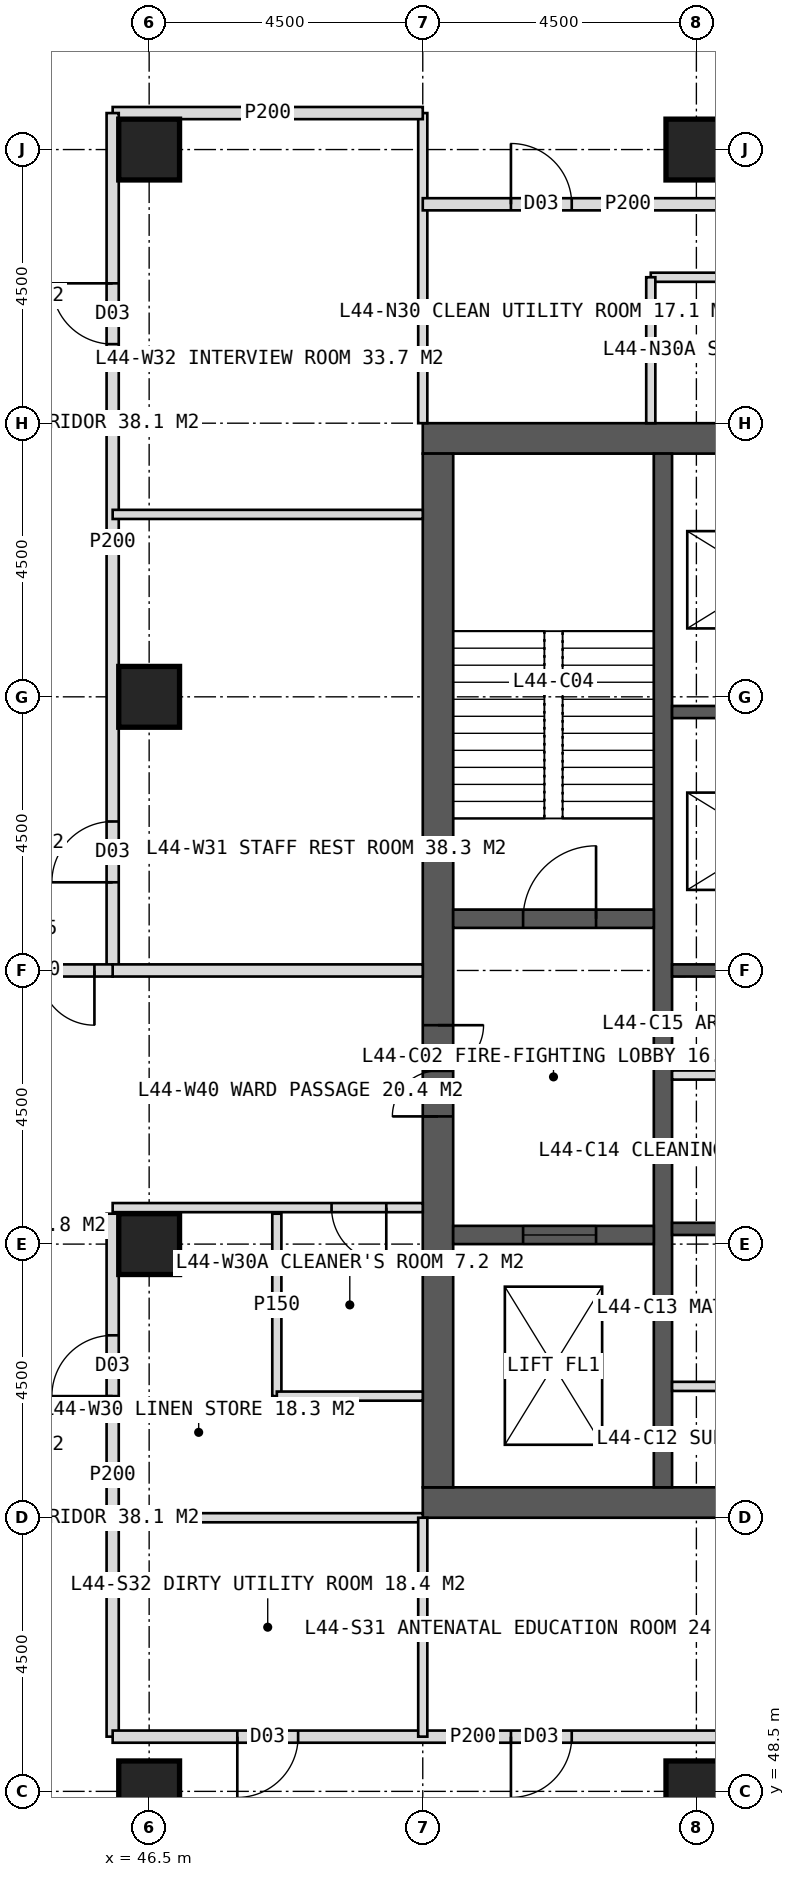
"""IFC4 building model, lengths in metres.
Left out: names, types, materials, properties, quantities, classifications, styles, units other than length and angle.
Written with IfcOpenShell. Run it as: python <this file> out.ifc"""

import sys

from ifc_helpers import new_model, si_unit, direction, frame, frame_2d, origin, origin_2d, place, context, subcontext, project, spatial, rectangle, hollow_rectangle, extrude, element, fill, save


model = new_model("IFC4")
c1 = context("Model", 3, precision=1e-05, world=origin(), true_north=direction((0.0, 1.0)))
c2 = subcontext(c1, "Body", "Model", "MODEL_VIEW")
j1 = project(units=[si_unit("LENGTHUNIT", "METRE"), si_unit("PLANEANGLEUNIT", "RADIAN")], contexts=[c1])
p1 = place(None, origin())
s1 = spatial("IfcSite", under=j1, at=p1, CompositionType="ELEMENT")
p2 = place(p1, origin())
s2 = spatial("IfcBuilding", under=s1, at=p2, CompositionType="ELEMENT")
p3 = place(p2, frame((0.0, 0.0, 185.0)))
s3 = spatial("IfcBuildingStorey", under=s2, at=p3, CompositionType="ELEMENT", Elevation=185.0)
p4 = place(p3, frame((51.0, 70.75, 0.0), z_axis=(0.0, 0.0, 1.0), x_axis=(1.0, 0.0, 0.0)))
e1 = element("IfcWall", 1, at=p4, inside=s3, PredefinedType="SHEAR", context=c2, shape_type="SweptSolid", body=[
    extrude(rectangle(XDim=18.0, YDim=0.5, at=frame_2d((9.0, 0.0))), origin(), (0.0, 0.0, 1.0), 4.0),
])
p5 = place(p4, frame((8.1, 0.0, 0.0)))
e2 = element("IfcOpeningElement", 2, at=p5, cuts=e1, PredefinedType="OPENING", context=c2, shape_type="SweptSolid", body=[
    extrude(rectangle(XDim=1.8, YDim=2.2, at=frame_2d((0.9, 1.1))), frame((0.0, 0.26, 0.0), z_axis=(0.0, -1.0, 0.0), x_axis=(1.0, 0.0, 0.0)), (0.0, 0.0, 1.0), 0.52),
])
p6 = place(p3, frame((51.0, 53.25, 0.0), z_axis=(0.0, 0.0, 1.0), x_axis=(1.0, 0.0, 0.0)))
e3 = element("IfcWall", 3, at=p6, inside=s3, PredefinedType="SHEAR", context=c2, shape_type="SweptSolid", body=[
    extrude(rectangle(XDim=18.0, YDim=0.5, at=frame_2d((9.0, 0.0))), origin(), (0.0, 0.0, 1.0), 4.0),
])
p7 = place(p6, frame((8.1, 0.0, 0.0)))
e4 = element("IfcOpeningElement", 4, at=p7, cuts=e3, PredefinedType="OPENING", context=c2, shape_type="SweptSolid", body=[
    extrude(rectangle(XDim=1.8, YDim=2.2, at=frame_2d((0.9, 1.1))), frame((0.0, 0.26, 0.0), z_axis=(0.0, -1.0, 0.0), x_axis=(1.0, 0.0, 0.0)), (0.0, 0.0, 1.0), 0.52),
])
p8 = place(p3, frame((51.25, 53.5, 0.0), z_axis=(0.0, 0.0, 1.0), x_axis=(0.0, 1.0, 0.0)))
e5 = element("IfcWall", 5, at=p8, inside=s3, PredefinedType="SHEAR", context=c2, shape_type="SweptSolid", body=[
    extrude(rectangle(XDim=17.0, YDim=0.5, at=frame_2d((8.5, 0.0))), origin(), (0.0, 0.0, 1.0), 4.0),
])
p9 = place(p8, frame((6.1, 0.0, 0.0)))
e6 = element("IfcOpeningElement", 6, at=p9, cuts=e5, PredefinedType="OPENING", context=c2, shape_type="SweptSolid", body=[
    extrude(rectangle(XDim=1.5, YDim=2.2, at=frame_2d((0.75, 1.1))), frame((0.0, 0.26, 0.0), z_axis=(0.0, -1.0, 0.0), x_axis=(1.0, 0.0, 0.0)), (0.0, 0.0, 1.0), 0.52),
])
p10 = place(p3, frame((54.95, 53.5, 0.0), z_axis=(0.0, 0.0, 1.0), x_axis=(0.0, 1.0, 0.0)))
e7 = element("IfcWall", 7, at=p10, inside=s3, PredefinedType="SHEAR", context=c2, shape_type="SweptSolid", body=[
    extrude(rectangle(XDim=17.0, YDim=0.3, at=frame_2d((8.5, 0.0))), origin(), (0.0, 0.0, 1.0), 4.0),
])
for number, where, z_axis, x_axis in (
    (8, (55.1, 57.75, 0.0), (0.0, 0.0, 1.0), (1.0, 0.0, 0.0)),
    (9, (55.1, 62.0, 0.0), (0.0, 0.0, 1.0), (1.0, 0.0, 0.0)),
    (10, (55.1, 66.25, 0.0), (0.0, 0.0, 1.0), (1.0, 0.0, 0.0)),
):
    element("IfcWall", number, at=place(p3, frame(where, z_axis=z_axis, x_axis=x_axis)), inside=s3, PredefinedType="SHEAR", context=c2, shape_type="SweptSolid", body=[
        extrude(rectangle(XDim=3.05, YDim=0.2, at=frame_2d((1.525, 0.0))), origin(), (0.0, 0.0, 1.0), 4.0),
    ])
p11 = place(p3, frame((51.5, 62.85, 0.0), z_axis=(0.0, 0.0, 1.0), x_axis=(1.0, 0.0, 0.0)))
e11 = element("IfcWall", 11, at=p11, inside=s3, PredefinedType="SHEAR", context=c2, shape_type="SweptSolid", body=[
    extrude(rectangle(XDim=3.3, YDim=0.3, at=frame_2d((1.65, 0.0))), origin(), (0.0, 0.0, 1.0), 4.0),
])
p12 = place(p11, frame((1.15, 0.0, 0.0)))
e12 = element("IfcOpeningElement", 12, at=p12, cuts=e11, PredefinedType="OPENING", context=c2, shape_type="SweptSolid", body=[
    extrude(rectangle(XDim=1.2, YDim=2.1, at=frame_2d((0.6, 1.05))), frame((0.0, 0.16, 0.0), z_axis=(0.0, -1.0, 0.0), x_axis=(1.0, 0.0, 0.0)), (0.0, 0.0, 1.0), 0.32),
])
p13 = place(p3, frame((51.5, 57.65, 0.0), z_axis=(0.0, 0.0, 1.0), x_axis=(1.0, 0.0, 0.0)))
e13 = element("IfcWall", 13, at=p13, inside=s3, PredefinedType="SHEAR", context=c2, shape_type="SweptSolid", body=[
    extrude(rectangle(XDim=3.3, YDim=0.3, at=frame_2d((1.65, 0.0))), origin(), (0.0, 0.0, 1.0), 4.0),
])
p14 = place(p13, frame((1.15, 0.0, 0.0)))
e14 = element("IfcOpeningElement", 14, at=p14, cuts=e13, PredefinedType="OPENING", context=c2, shape_type="SweptSolid", body=[
    extrude(rectangle(XDim=1.2, YDim=2.2, at=frame_2d((0.6, 1.1))), frame((0.0, 0.16, 0.0), z_axis=(0.0, -1.0, 0.0), x_axis=(1.0, 0.0, 0.0)), (0.0, 0.0, 1.0), 0.32),
])
for number, where, z_axis, x_axis in (
    (15, (46.5, 48.5, 0.0), (0.0, 0.0, 1.0), (1.0, 0.0, 0.0)),
    (16, (46.5, 75.5, 0.0), (0.0, 0.0, 1.0), (1.0, 0.0, 0.0)),
    (17, (55.5, 48.5, 0.0), (0.0, 0.0, 1.0), (1.0, 0.0, 0.0)),
    (18, (55.5, 75.5, 0.0), (0.0, 0.0, 1.0), (1.0, 0.0, 0.0)),
    (19, (46.5, 57.5, 0.0), (0.0, 0.0, 1.0), (1.0, 0.0, 0.0)),
    (20, (46.5, 66.5, 0.0), (0.0, 0.0, 1.0), (1.0, 0.0, 0.0)),
):
    element("IfcColumn", number, at=place(p3, frame(where, z_axis=z_axis, x_axis=x_axis)), inside=s3, PredefinedType="COLUMN", context=c2, shape_type="SweptSolid", body=[
        extrude(hollow_rectangle(XDim=1.0, YDim=1.0, WallThickness=0.1, at=origin_2d()), origin(), (0.0, 0.0, 1.0), 4.0),
    ])
p15 = place(p3, frame((51.0, 71.0, 0.0), z_axis=(0.0, 0.0, 1.0), x_axis=(0.0, 1.0, 0.0)))
e21 = element("IfcWall", 21, at=p15, inside=s3, PredefinedType="PARTITIONING", context=c2, shape_type="SweptSolid", body=[
    extrude(rectangle(XDim=5.1, YDim=0.15, at=frame_2d((2.55, 0.0))), origin(), (0.0, 0.0, 1.0), 3.75),
])
p16 = place(p3, frame((45.9, 76.1, 0.0), z_axis=(0.0, 0.0, 1.0), x_axis=(1.0, 0.0, 0.0)))
e22 = element("IfcWall", 22, at=p16, inside=s3, PredefinedType="PARTITIONING", context=c2, shape_type="SweptSolid", body=[
    extrude(rectangle(XDim=5.1, YDim=0.2, at=frame_2d((2.55, 0.0))), origin(), (0.0, 0.0, 1.0), 3.75),
])
p17 = place(p3, frame((51.0, 74.6, 0.0), z_axis=(0.0, 0.0, 1.0), x_axis=(1.0, 0.0, 0.0)))
e23 = element("IfcWall", 23, at=p17, inside=s3, PredefinedType="PARTITIONING", context=c2, shape_type="SweptSolid", body=[
    extrude(rectangle(XDim=6.75, YDim=0.2, at=frame_2d((3.375, 0.0))), origin(), (0.0, 0.0, 1.0), 3.75),
])
p18 = place(p17, frame((1.45, 0.0, 0.0)))
e24 = element("IfcOpeningElement", 24, at=p18, cuts=e23, PredefinedType="OPENING", context=c2, shape_type="SweptSolid", body=[
    extrude(rectangle(XDim=1.0, YDim=2.1, at=frame_2d((0.5, 1.05))), frame((0.0, 0.11, 0.0), z_axis=(0.0, -1.0, 0.0), x_axis=(1.0, 0.0, 0.0)), (0.0, 0.0, 1.0), 0.22),
])
p19 = place(p3, frame((54.75, 73.4, 0.0), z_axis=(0.0, 0.0, 1.0), x_axis=(1.0, 0.0, 0.0)))
e25 = element("IfcWall", 25, at=p19, inside=s3, PredefinedType="PARTITIONING", context=c2, shape_type="SweptSolid", body=[
    extrude(rectangle(XDim=3.0, YDim=0.15, at=frame_2d((1.5, 0.0))), origin(), (0.0, 0.0, 1.0), 3.75),
])
p20 = place(p3, frame((54.75, 71.0, 0.0), z_axis=(0.0, 0.0, 1.0), x_axis=(0.0, 1.0, 0.0)))
e26 = element("IfcWall", 26, at=p20, inside=s3, PredefinedType="PARTITIONING", context=c2, shape_type="SweptSolid", body=[
    extrude(rectangle(XDim=2.4, YDim=0.15, at=frame_2d((1.2, 0.0))), origin(), (0.0, 0.0, 1.0), 3.75),
])
p21 = place(p3, frame((51.0, 53.0, 0.0), z_axis=(0.0, 0.0, 1.0), x_axis=(-1.0, 0.0, 0.0)))
e27 = element("IfcWall", 27, at=p21, inside=s3, PredefinedType="PARTITIONING", context=c2, shape_type="SweptSolid", body=[
    extrude(rectangle(XDim=5.1, YDim=0.15, at=frame_2d((2.55, 0.0))), origin(), (0.0, 0.0, 1.0), 3.75),
])
p22 = place(p3, frame((45.9, 49.4, 0.0), z_axis=(0.0, 0.0, 1.0), x_axis=(0.0, 1.0, 0.0)))
e28 = element("IfcWall", 28, at=p22, inside=s3, PredefinedType="PARTITIONING", context=c2, shape_type="SweptSolid", body=[
    extrude(rectangle(XDim=8.6, YDim=0.2, at=frame_2d((4.3, 0.0))), origin(), (0.0, 0.0, 1.0), 3.75),
])
p23 = place(p22, frame((5.6, 0.0, 0.0)))
e29 = element("IfcOpeningElement", 29, at=p23, cuts=e28, PredefinedType="OPENING", context=c2, shape_type="SweptSolid", body=[
    extrude(rectangle(XDim=1.0, YDim=2.1, at=frame_2d((0.5, 1.05))), frame((0.0, 0.11, 0.0), z_axis=(0.0, -1.0, 0.0), x_axis=(1.0, 0.0, 0.0)), (0.0, 0.0, 1.0), 0.22),
])
p24 = place(p3, frame((45.9, 62.0, 0.0), z_axis=(0.0, 0.0, 1.0), x_axis=(0.0, 1.0, 0.0)))
e30 = element("IfcWall", 30, at=p24, inside=s3, PredefinedType="PARTITIONING", context=c2, shape_type="SweptSolid", body=[
    extrude(rectangle(XDim=14.1, YDim=0.2, at=frame_2d((7.05, 0.0))), origin(), (0.0, 0.0, 1.0), 3.75),
])
p25 = place(p24, frame((1.45, 0.0, 0.0)))
e31 = element("IfcOpeningElement", 31, at=p25, cuts=e30, PredefinedType="OPENING", context=c2, shape_type="SweptSolid", body=[
    extrude(rectangle(XDim=1.0, YDim=2.1, at=frame_2d((0.5, 1.05))), frame((0.0, 0.11, 0.0), z_axis=(0.0, -1.0, 0.0), x_axis=(1.0, 0.0, 0.0)), (0.0, 0.0, 1.0), 0.22),
])
p26 = place(p24, frame((10.3, 0.0, 0.0)))
e32 = element("IfcOpeningElement", 32, at=p26, cuts=e30, PredefinedType="OPENING", context=c2, shape_type="SweptSolid", body=[
    extrude(rectangle(XDim=1.0, YDim=2.1, at=frame_2d((0.5, 1.05))), frame((0.0, 0.11, 0.0), z_axis=(0.0, -1.0, 0.0), x_axis=(1.0, 0.0, 0.0)), (0.0, 0.0, 1.0), 0.22),
])
p27 = place(p3, frame((51.0, 58.1, 0.0), z_axis=(0.0, 0.0, 1.0), x_axis=(-1.0, 0.0, 0.0)))
e33 = element("IfcWall", 33, at=p27, inside=s3, PredefinedType="PARTITIONING", context=c2, shape_type="SweptSolid", body=[
    extrude(rectangle(XDim=5.1, YDim=0.15, at=frame_2d((2.55, 0.0))), origin(), (0.0, 0.0, 1.0), 3.75),
])
p28 = place(p27, frame((0.6, 0.0, 0.0)))
e34 = element("IfcOpeningElement", 34, at=p28, cuts=e33, PredefinedType="OPENING", context=c2, shape_type="SweptSolid", body=[
    extrude(rectangle(XDim=0.9, YDim=2.1, at=frame_2d((0.45, 1.05))), frame((0.0, 0.085, 0.0), z_axis=(0.0, -1.0, 0.0), x_axis=(1.0, 0.0, 0.0)), (0.0, 0.0, 1.0), 0.17),
])
p29 = place(p3, frame((51.0, 62.0, 0.0), z_axis=(0.0, 0.0, 1.0), x_axis=(-1.0, 0.0, 0.0)))
e35 = element("IfcWall", 35, at=p29, inside=s3, PredefinedType="SOLIDWALL", context=c2, shape_type="SweptSolid", body=[
    extrude(rectangle(XDim=5.1, YDim=0.2, at=frame_2d((2.55, 0.0))), origin(), (0.0, 0.0, 1.0), 2.95),
])
p30 = place(p3, frame((51.0, 69.5, 0.0), z_axis=(0.0, 0.0, 1.0), x_axis=(-1.0, 0.0, 0.0)))
e36 = element("IfcWall", 36, at=p30, inside=s3, PredefinedType="PARTITIONING", context=c2, shape_type="SweptSolid", body=[
    extrude(rectangle(XDim=5.1, YDim=0.15, at=frame_2d((2.55, 0.0))), origin(), (0.0, 0.0, 1.0), 3.75),
])
p31 = place(p3, frame((48.6, 55.0, 0.0), z_axis=(0.0, 0.0, 1.0), x_axis=(0.0, 1.0, 0.0)))
e37 = element("IfcWall", 37, at=p31, inside=s3, PredefinedType="PARTITIONING", context=c2, shape_type="SweptSolid", body=[
    extrude(rectangle(XDim=3.0, YDim=0.15, at=frame_2d((1.5, 0.0))), origin(), (0.0, 0.0, 1.0), 3.75),
])
p32 = place(p3, frame((51.0, 55.0, 0.0), z_axis=(0.0, 0.0, 1.0), x_axis=(-1.0, 0.0, 0.0)))
e38 = element("IfcWall", 38, at=p32, inside=s3, PredefinedType="PARTITIONING", context=c2, shape_type="SweptSolid", body=[
    extrude(rectangle(XDim=2.4, YDim=0.15, at=frame_2d((1.2, 0.0))), origin(), (0.0, 0.0, 1.0), 3.75),
])
p33 = place(p3, frame((57.75, 49.4, 0.0), z_axis=(0.0, 0.0, 1.0), x_axis=(-1.0, 0.0, 0.0)))
e39 = element("IfcWall", 39, at=p33, inside=s3, PredefinedType="PARTITIONING", context=c2, shape_type="SweptSolid", body=[
    extrude(rectangle(XDim=11.85, YDim=0.2, at=frame_2d((5.925, 0.0))), origin(), (0.0, 0.0, 1.0), 3.75),
])
p34 = place(p33, frame((4.3, 0.0, 0.0)))
e40 = element("IfcOpeningElement", 40, at=p34, cuts=e39, PredefinedType="OPENING", context=c2, shape_type="SweptSolid", body=[
    extrude(rectangle(XDim=1.0, YDim=2.1, at=frame_2d((0.5, 1.05))), frame((0.0, 0.11, 0.0), z_axis=(0.0, -1.0, 0.0), x_axis=(1.0, 0.0, 0.0)), (0.0, 0.0, 1.0), 0.22),
])
p35 = place(p33, frame((8.8, 0.0, 0.0)))
e41 = element("IfcOpeningElement", 41, at=p35, cuts=e39, PredefinedType="OPENING", context=c2, shape_type="SweptSolid", body=[
    extrude(rectangle(XDim=1.0, YDim=2.1, at=frame_2d((0.5, 1.05))), frame((0.0, 0.11, 0.0), z_axis=(0.0, -1.0, 0.0), x_axis=(1.0, 0.0, 0.0)), (0.0, 0.0, 1.0), 0.22),
])
p36 = place(p3, frame((51.0, 53.0, 0.0), z_axis=(0.0, 0.0, 1.0), x_axis=(0.0, -1.0, 0.0)))
e42 = element("IfcWall", 42, at=p36, inside=s3, PredefinedType="PARTITIONING", context=c2, shape_type="SweptSolid", body=[
    extrude(rectangle(XDim=3.6, YDim=0.15, at=frame_2d((1.8, 0.0))), origin(), (0.0, 0.0, 1.0), 3.75),
])
p37 = place(p3, frame((45.9, 62.0, 0.0), z_axis=(0.0, 0.0, 1.0), x_axis=(-1.0, 0.0, 0.0)))
e43 = element("IfcWall", 43, at=p37, inside=s3, PredefinedType="SOLIDWALL", context=c2, shape_type="SweptSolid", body=[
    extrude(rectangle(XDim=2.7, YDim=0.2, at=frame_2d((1.35, 0.0))), origin(), (0.0, 0.0, 1.0), 2.95),
])
p38 = place(p37, frame((0.3, 0.0, 0.0)))
e44 = element("IfcOpeningElement", 44, at=p38, cuts=e43, PredefinedType="OPENING", context=c2, shape_type="SweptSolid", body=[
    extrude(rectangle(XDim=1.8, YDim=2.2, at=frame_2d((0.9, 1.1))), frame((0.0, 0.11, 0.0), z_axis=(0.0, -1.0, 0.0), x_axis=(1.0, 0.0, 0.0)), (0.0, 0.0, 1.0), 0.22),
])
for number, where, z_axis, x_axis in (
    (45, (55.1, 55.16, 0.0), (0.0, 0.0, 1.0), (1.0, 0.0, 0.0)),
    (46, (55.1, 60.28, 0.0), (0.0, 0.0, 1.0), (1.0, 0.0, 0.0)),
):
    element("IfcWall", number, at=place(p3, frame(where, z_axis=z_axis, x_axis=x_axis)), inside=s3, PredefinedType="PARTITIONING", context=c2, shape_type="SweptSolid", body=[
        extrude(rectangle(XDim=3.05, YDim=0.15, at=frame_2d((1.525, 0.0))), origin(), (0.0, 0.0, 1.0), 3.75),
    ])
p39 = place(p18, origin())
e47 = element("IfcDoor", 47, at=p39, inside=s3, OperationType="SINGLE_SWING_LEFT", PredefinedType="DOOR", context=c2, shape_type="SweptSolid", body=[
    extrude(rectangle(XDim=1.0, YDim=2.1, at=frame_2d((0.5, 1.05))), frame((0.0, 0.025, 0.0), z_axis=(0.0, -1.0, 0.0), x_axis=(1.0, 0.0, 0.0)), (0.0, 0.0, 1.0), 0.05),
])
fill(e24, e47)
p40 = place(p28, origin())
e48 = element("IfcDoor", 48, at=p40, inside=s3, OperationType="SINGLE_SWING_LEFT", PredefinedType="DOOR", context=c2, shape_type="SweptSolid", body=[
    extrude(rectangle(XDim=0.9, YDim=2.1, at=frame_2d((0.45, 1.05))), frame((0.0, 0.025, 0.0), z_axis=(0.0, -1.0, 0.0), x_axis=(1.0, 0.0, 0.0)), (0.0, 0.0, 1.0), 0.05),
])
fill(e34, e48)
p41 = place(p23, origin())
e49 = element("IfcDoor", 49, at=p41, inside=s3, OperationType="SINGLE_SWING_LEFT", PredefinedType="DOOR", context=c2, shape_type="SweptSolid", body=[
    extrude(rectangle(XDim=1.0, YDim=2.1, at=frame_2d((0.5, 1.05))), frame((0.0, 0.025, 0.0), z_axis=(0.0, -1.0, 0.0), x_axis=(1.0, 0.0, 0.0)), (0.0, 0.0, 1.0), 0.05),
])
fill(e29, e49)
p42 = place(p25, origin())
e50 = element("IfcDoor", 50, at=p42, inside=s3, OperationType="SINGLE_SWING_LEFT", PredefinedType="DOOR", context=c2, shape_type="SweptSolid", body=[
    extrude(rectangle(XDim=1.0, YDim=2.1, at=frame_2d((0.5, 1.05))), frame((0.0, 0.025, 0.0), z_axis=(0.0, -1.0, 0.0), x_axis=(1.0, 0.0, 0.0)), (0.0, 0.0, 1.0), 0.05),
])
fill(e31, e50)
p43 = place(p26, origin())
e51 = element("IfcDoor", 51, at=p43, inside=s3, OperationType="SINGLE_SWING_RIGHT", PredefinedType="DOOR", context=c2, shape_type="SweptSolid", body=[
    extrude(rectangle(XDim=1.0, YDim=2.1, at=frame_2d((0.5, 1.05))), frame((0.0, 0.025, 0.0), z_axis=(0.0, -1.0, 0.0), x_axis=(1.0, 0.0, 0.0)), (0.0, 0.0, 1.0), 0.05),
])
fill(e32, e51)
p44 = place(p34, origin())
e52 = element("IfcDoor", 52, at=p44, inside=s3, OperationType="SINGLE_SWING_RIGHT", PredefinedType="DOOR", context=c2, shape_type="SweptSolid", body=[
    extrude(rectangle(XDim=1.0, YDim=2.1, at=frame_2d((0.5, 1.05))), frame((0.0, 0.025, 0.0), z_axis=(0.0, -1.0, 0.0), x_axis=(1.0, 0.0, 0.0)), (0.0, 0.0, 1.0), 0.05),
])
fill(e40, e52)
p45 = place(p35, origin())
e53 = element("IfcDoor", 53, at=p45, inside=s3, OperationType="SINGLE_SWING_RIGHT", PredefinedType="DOOR", context=c2, shape_type="SweptSolid", body=[
    extrude(rectangle(XDim=1.0, YDim=2.1, at=frame_2d((0.5, 1.05))), frame((0.0, 0.025, 0.0), z_axis=(0.0, -1.0, 0.0), x_axis=(1.0, 0.0, 0.0)), (0.0, 0.0, 1.0), 0.05),
])
fill(e41, e53)
p46 = place(p38, origin())
e54 = element("IfcDoor", 54, at=p46, inside=s3, OperationType="DOUBLE_DOOR_DOUBLE_SWING", PredefinedType="DOOR", context=c2, shape_type="SweptSolid", body=[
    extrude(rectangle(XDim=1.8, YDim=2.2, at=frame_2d((0.9, 1.1))), frame((0.0, 0.025, 0.0), z_axis=(0.0, -1.0, 0.0), x_axis=(1.0, 0.0, 0.0)), (0.0, 0.0, 1.0), 0.05),
])
fill(e44, e54)
p47 = place(p9, origin())
e55 = element("IfcDoor", 55, at=p47, inside=s3, OperationType="DOUBLE_DOOR_SINGLE_SWING", PredefinedType="DOOR", context=c2, shape_type="SweptSolid", body=[
    extrude(rectangle(XDim=1.5, YDim=2.2, at=frame_2d((0.75, 1.1))), frame((0.0, 0.025, 0.0), z_axis=(0.0, -1.0, 0.0), x_axis=(1.0, 0.0, 0.0)), (0.0, 0.0, 1.0), 0.05),
])
fill(e6, e55)
p48 = place(p12, origin())
e56 = element("IfcDoor", 56, at=p48, inside=s3, OperationType="SINGLE_SWING_RIGHT", PredefinedType="DOOR", context=c2, shape_type="SweptSolid", body=[
    extrude(rectangle(XDim=1.2, YDim=2.1, at=frame_2d((0.6, 1.05))), frame((0.0, 0.025, 0.0), z_axis=(0.0, -1.0, 0.0), x_axis=(1.0, 0.0, 0.0)), (0.0, 0.0, 1.0), 0.05),
])
fill(e12, e56)
p49 = place(p14, origin())
e57 = element("IfcDoor", 57, at=p49, inside=s3, OperationType="SLIDING_TO_LEFT", PredefinedType="DOOR", context=c2, shape_type="SweptSolid", body=[
    extrude(rectangle(XDim=1.2, YDim=2.2, at=frame_2d((0.6, 1.1))), frame((0.0, 0.025, 0.0), z_axis=(0.0, -1.0, 0.0), x_axis=(1.0, 0.0, 0.0)), (0.0, 0.0, 1.0), 0.05),
])
fill(e14, e57)
save(model, sys.argv[1])
